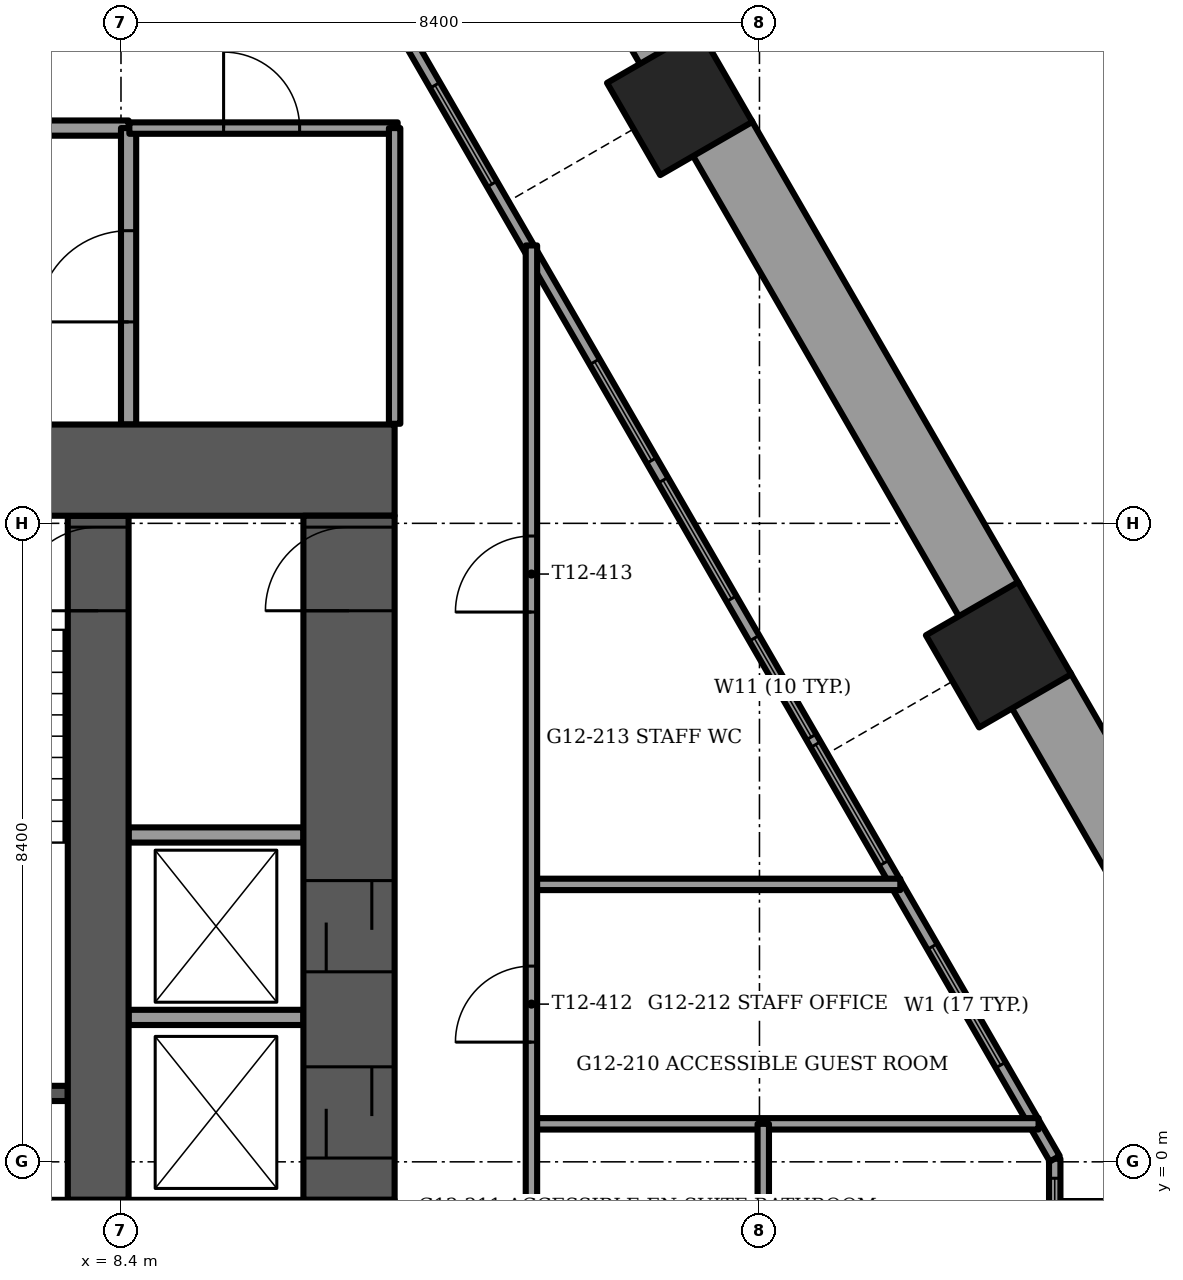
"""IFC4 building model, lengths in metres.
Left out: names, types, materials, properties, quantities, classifications, styles, units other than length and angle.
Written with IfcOpenShell. Run it as: python <this file> out.ifc"""

import sys

from ifc_helpers import new_model, si_unit, direction, frame, frame_2d, origin, origin_2d, place, context, subcontext, project, spatial, rectangle, extrude, element, fill, save


model = new_model("IFC4")
c1 = context("Model", 3, precision=1e-05, world=origin(), true_north=direction((0.0, 1.0)))
c2 = subcontext(c1, "Body", "Model", "MODEL_VIEW")
j1 = project(units=[si_unit("LENGTHUNIT", "METRE"), si_unit("PLANEANGLEUNIT", "RADIAN")], contexts=[c1])
p1 = place(None, origin())
s1 = spatial("IfcSite", under=j1, at=p1, CompositionType="ELEMENT")
p2 = place(p1, origin())
s2 = spatial("IfcBuilding", under=s1, at=p2, CompositionType="ELEMENT")
p3 = place(p2, frame((0.0, 0.0, 50.5)))
s3 = spatial("IfcBuildingStorey", under=s2, at=p3, CompositionType="ELEMENT", Elevation=50.5)
for number, where, z_axis, x_axis in (
    (1, (19.946, 6.671, -1.2), (0.0, 0.0, 1.0), (0.5, -0.866, 0.0)),
    (2, (15.75, 13.938, -1.2), (0.0, 0.0, 1.0), (0.5, -0.866, 0.0)),
):
    element("IfcColumn", number, at=place(p3, frame(where, z_axis=z_axis, x_axis=x_axis)), inside=s3, PredefinedType="COLUMN", context=c2, shape_type="SweptSolid", body=[
        extrude(rectangle(XDim=1.4, YDim=1.4, at=origin_2d()), origin(), (0.0, 0.0, 1.0), 3.75),
    ])
p4 = place(p3, frame((-12.0, 9.1, -0.3), z_axis=(0.0, 0.0, 1.0), x_axis=(1.0, 0.0, 0.0)))
e3 = element("IfcWall", 3, at=p4, inside=s3, PredefinedType="SHEAR", context=c2, shape_type="SweptSolid", body=[
    extrude(rectangle(XDim=24.0, YDim=1.2, at=frame_2d((12.0, 0.0))), origin(), (0.0, 0.0, 1.0), 3.75),
])
p5 = place(p4, frame((11.2, 0.0, 0.0)))
e4 = element("IfcOpeningElement", 4, at=p5, cuts=e3, PredefinedType="OPENING", context=c2, shape_type="SweptSolid", body=[
    extrude(rectangle(XDim=1.6, YDim=2.1, at=frame_2d((0.8, 1.05))), frame((0.0, 0.6, 0.0), z_axis=(0.0, -1.0, 0.0), x_axis=(1.0, 0.0, 0.0)), (0.0, 0.0, 1.0), 1.2),
])
p6 = place(p4, frame((5.25, 0.0, 0.0)))
e5 = element("IfcOpeningElement", 5, at=p6, cuts=e3, PredefinedType="OPENING", context=c2, shape_type="SweptSolid", body=[
    extrude(rectangle(XDim=1.1, YDim=2.1, at=frame_2d((0.55, 1.05))), frame((0.0, 0.6, 0.0), z_axis=(0.0, -1.0, 0.0), x_axis=(1.0, 0.0, 0.0)), (0.0, 0.0, 1.0), 1.2),
])
p7 = place(p4, frame((17.65, 0.0, 0.0)))
e6 = element("IfcOpeningElement", 6, at=p7, cuts=e3, PredefinedType="OPENING", context=c2, shape_type="SweptSolid", body=[
    extrude(rectangle(XDim=1.1, YDim=2.1, at=frame_2d((0.55, 1.05))), frame((0.0, 0.6, 0.0), z_axis=(0.0, -1.0, 0.0), x_axis=(1.0, 0.0, 0.0)), (0.0, 0.0, 1.0), 1.2),
])
p8 = place(p3, frame((8.1, -0.5, -0.3), z_axis=(0.0, 0.0, 1.0), x_axis=(0.0, 1.0, 0.0)))
e7 = element("IfcWall", 7, at=p8, inside=s3, PredefinedType="SHEAR", context=c2, shape_type="SweptSolid", body=[
    extrude(rectangle(XDim=9.0, YDim=0.8, at=frame_2d((4.5, 0.0))), origin(), (0.0, 0.0, 1.0), 3.75),
])
p9 = place(p8, frame((7.75, 0.0, 0.0)))
e8 = element("IfcOpeningElement", 8, at=p9, cuts=e7, PredefinedType="OPENING", context=c2, shape_type="SweptSolid", body=[
    extrude(rectangle(XDim=1.1, YDim=2.1, at=frame_2d((0.55, 1.05))), frame((0.0, 0.4, 0.0), z_axis=(0.0, -1.0, 0.0), x_axis=(1.0, 0.0, 0.0)), (0.0, 0.0, 1.0), 0.8),
])
p10 = place(p3, frame((11.4, -0.5, -0.3), z_axis=(0.0, 0.0, 1.0), x_axis=(0.0, 1.0, 0.0)))
e9 = element("IfcWall", 9, at=p10, inside=s3, PredefinedType="SHEAR", context=c2, shape_type="SweptSolid", body=[
    extrude(rectangle(XDim=9.0, YDim=1.2, at=frame_2d((4.5, 0.0))), origin(), (0.0, 0.0, 1.0), 3.75),
])
p11 = place(p10, frame((7.75, 0.0, 0.0)))
e10 = element("IfcOpeningElement", 10, at=p11, cuts=e9, PredefinedType="OPENING", context=c2, shape_type="SweptSolid", body=[
    extrude(rectangle(XDim=1.1, YDim=2.1, at=frame_2d((0.55, 1.05))), frame((0.0, 0.6, 0.0), z_axis=(0.0, -1.0, 0.0), x_axis=(1.0, 0.0, 0.0)), (0.0, 0.0, 1.0), 1.2),
])
p12 = place(p10, frame((0.55, 0.0, 0.0)))
e11 = element("IfcOpeningElement", 11, at=p12, cuts=e9, PredefinedType="OPENING", context=c2, shape_type="SweptSolid", body=[
    extrude(rectangle(XDim=1.2, YDim=2.1, at=frame_2d((0.6, 1.05))), frame((0.0, 0.6, 0.0), z_axis=(0.0, -1.0, 0.0), x_axis=(1.0, 0.0, 0.0)), (0.0, 0.0, 1.0), 1.2),
])
p13 = place(p10, frame((3.0, 0.0, 0.0)))
e12 = element("IfcOpeningElement", 12, at=p13, cuts=e9, PredefinedType="OPENING", context=c2, shape_type="SweptSolid", body=[
    extrude(rectangle(XDim=1.2, YDim=2.1, at=frame_2d((0.6, 1.05))), frame((0.0, 0.6, 0.0), z_axis=(0.0, -1.0, 0.0), x_axis=(1.0, 0.0, 0.0)), (0.0, 0.0, 1.0), 1.2),
])
p14 = place(p3, frame((23.991, 0.165, 0.0), z_axis=(0.0, 0.0, 1.0), x_axis=(-0.499983583635, 0.86603488157, 0.0)))
e13 = element("IfcWall", 13, at=p14, inside=s3, PredefinedType="PARAPET", context=c2, shape_type="SweptSolid", body=[
    extrude(rectangle(XDim=6.987, YDim=0.9, at=frame_2d((3.494, 0.0))), origin(), (0.0, 0.0, 1.0), 1.1),
])
p15 = place(p3, frame((19.827, 7.376, 0.0), z_axis=(0.0, 0.0, 1.0), x_axis=(-0.499997206141, 0.866027016814, 0.0)))
e14 = element("IfcWall", 14, at=p15, inside=s3, PredefinedType="PARAPET", context=c2, shape_type="SweptSolid", body=[
    extrude(rectangle(XDim=7.051, YDim=0.9, at=frame_2d((3.525, 0.0))), origin(), (0.0, 0.0, 1.0), 1.1),
])
p16 = place(p3, frame((15.632, 14.643, 0.0), z_axis=(0.0, 0.0, 1.0), x_axis=(-0.500009789943, 0.866019751484, 0.0)))
e15 = element("IfcWall", 15, at=p16, inside=s3, PredefinedType="PARAPET", context=c2, shape_type="SweptSolid", body=[
    extrude(rectangle(XDim=6.987, YDim=0.9, at=frame_2d((3.494, 0.0))), origin(), (0.0, 0.0, 1.0), 1.1),
])
p17 = place(p3, frame((20.685, 0.042, 0.0), z_axis=(0.0, 0.0, 1.0), x_axis=(-0.49999960747, 0.866025630412, 0.0)))
e16 = element("IfcWall", 16, at=p17, inside=s3, PredefinedType="SOLIDWALL", context=c2, shape_type="SweptSolid", body=[
    extrude(rectangle(XDim=23.384, YDim=0.15, at=frame_2d((11.692, 0.0))), origin(), (0.0, 0.0, 1.0), 3.45),
])
p18 = place(p17, frame((4.491, 0.0, 0.15)))
e17 = element("IfcOpeningElement", 17, at=p18, cuts=e16, PredefinedType="OPENING", context=c2, shape_type="SweptSolid", body=[
    extrude(rectangle(XDim=1.8, YDim=2.85, at=frame_2d((0.9, 1.425))), frame((0.0, 0.075, 0.0), z_axis=(0.0, -1.0, 0.0), x_axis=(1.0, 0.0, 0.0)), (0.0, 0.0, 1.0), 0.15),
])
p19 = place(p17, frame((6.406, 0.0, 0.15)))
e18 = element("IfcOpeningElement", 18, at=p19, cuts=e16, PredefinedType="OPENING", context=c2, shape_type="SweptSolid", body=[
    extrude(rectangle(XDim=1.5, YDim=2.85, at=frame_2d((0.75, 1.425))), frame((0.0, 0.075, 0.0), z_axis=(0.0, -1.0, 0.0), x_axis=(1.0, 0.0, 0.0)), (0.0, 0.0, 1.0), 0.15),
])
p20 = place(p17, frame((8.506, 0.0, 0.15)))
e19 = element("IfcOpeningElement", 19, at=p20, cuts=e16, PredefinedType="OPENING", context=c2, shape_type="SweptSolid", body=[
    extrude(rectangle(XDim=1.8, YDim=2.85, at=frame_2d((0.9, 1.425))), frame((0.0, 0.075, 0.0), z_axis=(0.0, -1.0, 0.0), x_axis=(1.0, 0.0, 0.0)), (0.0, 0.0, 1.0), 0.15),
])
p21 = place(p17, frame((10.606, 0.0, 0.15)))
e20 = element("IfcOpeningElement", 20, at=p21, cuts=e16, PredefinedType="OPENING", context=c2, shape_type="SweptSolid", body=[
    extrude(rectangle(XDim=1.5, YDim=2.85, at=frame_2d((0.75, 1.425))), frame((0.0, 0.075, 0.0), z_axis=(0.0, -1.0, 0.0), x_axis=(1.0, 0.0, 0.0)), (0.0, 0.0, 1.0), 0.15),
])
p22 = place(p17, frame((14.806, 0.0, 0.15)))
e21 = element("IfcOpeningElement", 21, at=p22, cuts=e16, PredefinedType="OPENING", context=c2, shape_type="SweptSolid", body=[
    extrude(rectangle(XDim=1.5, YDim=2.85, at=frame_2d((0.75, 1.425))), frame((0.0, 0.075, 0.0), z_axis=(0.0, -1.0, 0.0), x_axis=(1.0, 0.0, 0.0)), (0.0, 0.0, 1.0), 0.15),
])
p23 = place(p17, frame((18.861, 0.0, 0.15)))
e22 = element("IfcOpeningElement", 22, at=p23, cuts=e16, PredefinedType="OPENING", context=c2, shape_type="SweptSolid", body=[
    extrude(rectangle(XDim=1.5, YDim=2.85, at=frame_2d((0.75, 1.425))), frame((0.0, 0.075, 0.0), z_axis=(0.0, -1.0, 0.0), x_axis=(1.0, 0.0, 0.0)), (0.0, 0.0, 1.0), 0.15),
])
p24 = place(p17, frame((1.422, 0.0, 0.15)))
e23 = element("IfcOpeningElement", 23, at=p24, cuts=e16, PredefinedType="OPENING", context=c2, shape_type="SweptSolid", body=[
    extrude(rectangle(XDim=1.8, YDim=2.73, at=frame_2d((0.9, 1.365))), frame((0.0, 0.075, 0.0), z_axis=(0.0, -1.0, 0.0), x_axis=(1.0, 0.0, 0.0)), (0.0, 0.0, 1.0), 0.15),
])
p25 = place(p17, frame((21.247, 0.0, 0.15)))
e24 = element("IfcOpeningElement", 24, at=p25, cuts=e16, PredefinedType="OPENING", context=c2, shape_type="SweptSolid", body=[
    extrude(rectangle(XDim=1.8, YDim=2.73, at=frame_2d((0.9, 1.365))), frame((0.0, 0.075, 0.0), z_axis=(0.0, -1.0, 0.0), x_axis=(1.0, 0.0, 0.0)), (0.0, 0.0, 1.0), 0.15),
])
p26 = place(p3, frame((20.685, -1.023, 0.0), z_axis=(0.0, 0.0, 1.0), x_axis=(0.0, 1.0, 0.0)))
e25 = element("IfcWall", 25, at=p26, inside=s3, PredefinedType="SOLIDWALL", context=c2, shape_type="SweptSolid", body=[
    extrude(rectangle(XDim=1.065, YDim=0.15, at=frame_2d((0.532, 0.0))), origin(), (0.0, 0.0, 1.0), 3.45),
])
p27 = place(p26, frame((0.258, 0.0, 0.15)))
e26 = element("IfcOpeningElement", 26, at=p27, cuts=e25, PredefinedType="OPENING", context=c2, shape_type="SweptSolid", body=[
    extrude(rectangle(XDim=0.55, YDim=2.85, at=frame_2d((0.275, 1.425))), frame((0.0, 0.075, 0.0), z_axis=(0.0, -1.0, 0.0), x_axis=(1.0, 0.0, 0.0)), (0.0, 0.0, 1.0), 0.15),
])
p28 = place(p3, frame((4.45, 0.9, -0.3), z_axis=(0.0, 0.0, 1.0), x_axis=(1.0, 0.0, 0.0)))
e27 = element("IfcWall", 27, at=p28, inside=s3, PredefinedType="SOLIDWALL", context=c2, shape_type="SweptSolid", body=[
    extrude(rectangle(XDim=3.25, YDim=0.2, at=frame_2d((1.625, 0.0))), origin(), (0.0, 0.0, 1.0), 3.75),
])
p29 = place(p3, frame((-8.5, 13.6, 0.0), z_axis=(0.0, 0.0, 1.0), x_axis=(1.0, 0.0, 0.0)))
e28 = element("IfcWall", 28, at=p29, inside=s3, PredefinedType="PARTITIONING", context=c2, shape_type="SweptSolid", body=[
    extrude(rectangle(XDim=17.0, YDim=0.2, at=frame_2d((8.5, 0.0))), origin(), (0.0, 0.0, 1.0), 3.45),
])
p30 = place(p29, frame((8.0, 0.0, 0.0)))
e29 = element("IfcOpeningElement", 29, at=p30, cuts=e28, PredefinedType="OPENING", context=c2, shape_type="SweptSolid", body=[
    extrude(rectangle(XDim=1.0, YDim=2.1, at=frame_2d((0.5, 1.05))), frame((0.0, 0.1, 0.0), z_axis=(0.0, -1.0, 0.0), x_axis=(1.0, 0.0, 0.0)), (0.0, 0.0, 1.0), 0.2),
])
p31 = place(p3, frame((8.5, 9.7, 0.0), z_axis=(0.0, 0.0, 1.0), x_axis=(0.0, 1.0, 0.0)))
e30 = element("IfcWall", 30, at=p31, inside=s3, PredefinedType="PARTITIONING", context=c2, shape_type="SweptSolid", body=[
    extrude(rectangle(XDim=3.9, YDim=0.2, at=frame_2d((1.95, 0.0))), origin(), (0.0, 0.0, 1.0), 3.45),
])
p32 = place(p31, frame((1.35, 0.0, 0.0)))
e31 = element("IfcOpeningElement", 31, at=p32, cuts=e30, PredefinedType="OPENING", context=c2, shape_type="SweptSolid", body=[
    extrude(rectangle(XDim=1.2, YDim=2.1, at=frame_2d((0.6, 1.05))), frame((0.0, 0.1, 0.0), z_axis=(0.0, -1.0, 0.0), x_axis=(1.0, 0.0, 0.0)), (0.0, 0.0, 1.0), 0.2),
])
for number, where, z_axis, x_axis in (
    (32, (8.5, 1.9, 0.0), (0.0, 0.0, 1.0), (1.0, 0.0, 0.0)),
    (33, (8.5, 4.3, 0.0), (0.0, 0.0, 1.0), (1.0, 0.0, 0.0)),
):
    element("IfcWall", number, at=place(p3, frame(where, z_axis=z_axis, x_axis=x_axis)), inside=s3, PredefinedType="PARTITIONING", context=c2, shape_type="SweptSolid", body=[
        extrude(rectangle(XDim=2.3, YDim=0.2, at=frame_2d((1.15, 0.0))), origin(), (0.0, 0.0, 1.0), 3.45),
    ])
p33 = place(p3, frame((13.8, 0.5, 0.0), z_axis=(0.0, 0.0, 1.0), x_axis=(1.0, 0.0, 0.0)))
e34 = element("IfcWall", 34, at=p33, inside=s3, PredefinedType="PARTITIONING", context=c2, shape_type="SweptSolid", body=[
    extrude(rectangle(XDim=6.672, YDim=0.15, at=frame_2d((3.336, 0.0))), origin(), (0.0, 0.0, 1.0), 3.45),
])
p34 = place(p3, frame((13.8, 3.65, 0.0), z_axis=(0.0, 0.0, 1.0), x_axis=(1.0, 0.0, 0.0)))
e35 = element("IfcWall", 35, at=p34, inside=s3, PredefinedType="PARTITIONING", context=c2, shape_type="SweptSolid", body=[
    extrude(rectangle(XDim=4.853, YDim=0.15, at=frame_2d((2.427, 0.0))), origin(), (0.0, 0.0, 1.0), 3.45),
])
p35 = place(p3, frame((8.51, 13.6, 0.0), z_axis=(0.0, 0.0, 1.0), x_axis=(1.0, 0.0, 0.0)))
e36 = element("IfcWall", 36, at=p35, inside=s3, PredefinedType="PARTITIONING", context=c2, shape_type="SweptSolid", body=[
    extrude(rectangle(XDim=3.53, YDim=0.15, at=frame_2d((1.765, 0.0))), origin(), (0.0, 0.0, 1.0), 3.45),
])
p36 = place(p35, frame((1.24, 0.0, 0.0)))
e37 = element("IfcOpeningElement", 37, at=p36, cuts=e36, PredefinedType="OPENING", context=c2, shape_type="SweptSolid", body=[
    extrude(rectangle(XDim=1.0, YDim=2.1, at=frame_2d((0.5, 1.05))), frame((0.0, 0.075, 0.0), z_axis=(0.0, -1.0, 0.0), x_axis=(1.0, 0.0, 0.0)), (0.0, 0.0, 1.0), 0.15),
])
p37 = place(p3, frame((16.85, -2.3, 0.0), z_axis=(0.0, 0.0, 1.0), x_axis=(0.0, 1.0, 0.0)))
e38 = element("IfcWall", 38, at=p37, inside=s3, PredefinedType="PARTITIONING", context=c2, shape_type="SweptSolid", body=[
    extrude(rectangle(XDim=2.8, YDim=0.15, at=frame_2d((1.4, 0.0))), origin(), (0.0, 0.0, 1.0), 3.45),
])
p38 = place(p3, frame((13.8, -3.7, 0.0), z_axis=(0.0, 0.0, 1.0), x_axis=(0.0, 1.0, 0.0)))
e39 = element("IfcWall", 39, at=p38, inside=s3, PredefinedType="PARTITIONING", context=c2, shape_type="SweptSolid", body=[
    extrude(rectangle(XDim=15.756, YDim=0.15, at=frame_2d((7.878, 0.0))), origin(), (0.0, 0.0, 1.0), 3.45),
])
p39 = place(p38, frame((0.25, 0.0, 0.0)))
e40 = element("IfcOpeningElement", 40, at=p39, cuts=e39, PredefinedType="OPENING", context=c2, shape_type="SweptSolid", body=[
    extrude(rectangle(XDim=1.0, YDim=2.1, at=frame_2d((0.5, 1.05))), frame((0.0, 0.075, 0.0), z_axis=(0.0, -1.0, 0.0), x_axis=(1.0, 0.0, 0.0)), (0.0, 0.0, 1.0), 0.15),
])
p40 = place(p38, frame((5.275, 0.0, 0.0)))
e41 = element("IfcOpeningElement", 41, at=p40, cuts=e39, PredefinedType="OPENING", context=c2, shape_type="SweptSolid", body=[
    extrude(rectangle(XDim=1.0, YDim=2.1, at=frame_2d((0.5, 1.05))), frame((0.0, 0.075, 0.0), z_axis=(0.0, -1.0, 0.0), x_axis=(1.0, 0.0, 0.0)), (0.0, 0.0, 1.0), 0.15),
])
p41 = place(p38, frame((10.933, 0.0, 0.0)))
e42 = element("IfcOpeningElement", 42, at=p41, cuts=e39, PredefinedType="OPENING", context=c2, shape_type="SweptSolid", body=[
    extrude(rectangle(XDim=1.0, YDim=2.1, at=frame_2d((0.5, 1.05))), frame((0.0, 0.075, 0.0), z_axis=(0.0, -1.0, 0.0), x_axis=(1.0, 0.0, 0.0)), (0.0, 0.0, 1.0), 0.15),
])
p42 = place(p3, frame((12.0, 9.71, 0.0), z_axis=(0.0, 0.0, 1.0), x_axis=(0.0, 1.0, 0.0)))
e43 = element("IfcWall", 43, at=p42, inside=s3, PredefinedType="PARTITIONING", context=c2, shape_type="SweptSolid", body=[
    extrude(rectangle(XDim=3.89, YDim=0.15, at=frame_2d((1.945, 0.0))), origin(), (0.0, 0.0, 1.0), 3.45),
])
p43 = place(p18, origin())
e44 = element("IfcWindow", 44, at=p43, inside=s3, PartitioningType="SINGLE_PANEL", PredefinedType="WINDOW", context=c2, shape_type="SweptSolid", body=[
    extrude(rectangle(XDim=1.8, YDim=2.85, at=frame_2d((0.9, 1.425))), frame((0.0, 0.03, 0.0), z_axis=(0.0, -1.0, 0.0), x_axis=(1.0, 0.0, 0.0)), (0.0, 0.0, 1.0), 0.06),
])
fill(e17, e44)
p44 = place(p19, origin())
e45 = element("IfcWindow", 45, at=p44, inside=s3, PartitioningType="SINGLE_PANEL", PredefinedType="WINDOW", context=c2, shape_type="SweptSolid", body=[
    extrude(rectangle(XDim=1.5, YDim=2.85, at=frame_2d((0.75, 1.425))), frame((0.0, 0.03, 0.0), z_axis=(0.0, -1.0, 0.0), x_axis=(1.0, 0.0, 0.0)), (0.0, 0.0, 1.0), 0.06),
])
fill(e18, e45)
p45 = place(p20, origin())
e46 = element("IfcWindow", 46, at=p45, inside=s3, PartitioningType="SINGLE_PANEL", PredefinedType="WINDOW", context=c2, shape_type="SweptSolid", body=[
    extrude(rectangle(XDim=1.8, YDim=2.85, at=frame_2d((0.9, 1.425))), frame((0.0, 0.03, 0.0), z_axis=(0.0, -1.0, 0.0), x_axis=(1.0, 0.0, 0.0)), (0.0, 0.0, 1.0), 0.06),
])
fill(e19, e46)
p46 = place(p21, origin())
e47 = element("IfcWindow", 47, at=p46, inside=s3, PartitioningType="SINGLE_PANEL", PredefinedType="WINDOW", context=c2, shape_type="SweptSolid", body=[
    extrude(rectangle(XDim=1.5, YDim=2.85, at=frame_2d((0.75, 1.425))), frame((0.0, 0.03, 0.0), z_axis=(0.0, -1.0, 0.0), x_axis=(1.0, 0.0, 0.0)), (0.0, 0.0, 1.0), 0.06),
])
fill(e20, e47)
p47 = place(p22, origin())
e48 = element("IfcWindow", 48, at=p47, inside=s3, PartitioningType="SINGLE_PANEL", PredefinedType="WINDOW", context=c2, shape_type="SweptSolid", body=[
    extrude(rectangle(XDim=1.5, YDim=2.85, at=frame_2d((0.75, 1.425))), frame((0.0, 0.03, 0.0), z_axis=(0.0, -1.0, 0.0), x_axis=(1.0, 0.0, 0.0)), (0.0, 0.0, 1.0), 0.06),
])
fill(e21, e48)
p48 = place(p24, origin())
e49 = element("IfcWindow", 49, at=p48, inside=s3, PartitioningType="SINGLE_PANEL", PredefinedType="WINDOW", context=c2, shape_type="SweptSolid", body=[
    extrude(rectangle(XDim=1.8, YDim=2.73, at=frame_2d((0.9, 1.365))), frame((0.0, 0.03, 0.0), z_axis=(0.0, -1.0, 0.0), x_axis=(1.0, 0.0, 0.0)), (0.0, 0.0, 1.0), 0.06),
])
fill(e23, e49)
p49 = place(p27, origin())
e50 = element("IfcWindow", 50, at=p49, inside=s3, PartitioningType="SINGLE_PANEL", PredefinedType="WINDOW", context=c2, shape_type="SweptSolid", body=[
    extrude(rectangle(XDim=0.55, YDim=2.85, at=frame_2d((0.275, 1.425))), frame((0.0, 0.03, 0.0), z_axis=(0.0, -1.0, 0.0), x_axis=(1.0, 0.0, 0.0)), (0.0, 0.0, 1.0), 0.06),
])
fill(e26, e50)
p50 = place(p9, origin())
e51 = element("IfcDoor", 51, at=p50, inside=s3, OperationType="SINGLE_SWING_LEFT", PredefinedType="DOOR", context=c2, shape_type="SweptSolid", body=[
    extrude(rectangle(XDim=1.1, YDim=2.1, at=frame_2d((0.55, 1.05))), frame((0.0, 0.025, 0.0), z_axis=(0.0, -1.0, 0.0), x_axis=(1.0, 0.0, 0.0)), (0.0, 0.0, 1.0), 0.05),
])
fill(e8, e51)
p51 = place(p32, origin())
e52 = element("IfcDoor", 52, at=p51, inside=s3, OperationType="SINGLE_SWING_LEFT", PredefinedType="DOOR", context=c2, shape_type="SweptSolid", body=[
    extrude(rectangle(XDim=1.2, YDim=2.1, at=frame_2d((0.6, 1.05))), frame((0.0, 0.025, 0.0), z_axis=(0.0, -1.0, 0.0), x_axis=(1.0, 0.0, 0.0)), (0.0, 0.0, 1.0), 0.05),
])
fill(e31, e52)
p52 = place(p11, origin())
e53 = element("IfcDoor", 53, at=p52, inside=s3, OperationType="SINGLE_SWING_RIGHT", PredefinedType="DOOR", context=c2, shape_type="SweptSolid", body=[
    extrude(rectangle(XDim=1.1, YDim=2.1, at=frame_2d((0.55, 1.05))), frame((0.0, 0.025, 0.0), z_axis=(0.0, -1.0, 0.0), x_axis=(1.0, 0.0, 0.0)), (0.0, 0.0, 1.0), 0.05),
])
fill(e10, e53)
p53 = place(p12, origin())
e54 = element("IfcDoor", 54, at=p53, inside=s3, OperationType="SLIDING_TO_LEFT", PredefinedType="DOOR", context=c2, shape_type="SweptSolid", body=[
    extrude(rectangle(XDim=1.2, YDim=2.1, at=frame_2d((0.6, 1.05))), frame((0.0, 0.025, 0.0), z_axis=(0.0, -1.0, 0.0), x_axis=(1.0, 0.0, 0.0)), (0.0, 0.0, 1.0), 0.05),
])
fill(e11, e54)
p54 = place(p13, origin())
e55 = element("IfcDoor", 55, at=p54, inside=s3, OperationType="SLIDING_TO_LEFT", PredefinedType="DOOR", context=c2, shape_type="SweptSolid", body=[
    extrude(rectangle(XDim=1.2, YDim=2.1, at=frame_2d((0.6, 1.05))), frame((0.0, 0.025, 0.0), z_axis=(0.0, -1.0, 0.0), x_axis=(1.0, 0.0, 0.0)), (0.0, 0.0, 1.0), 0.05),
])
fill(e12, e55)
p55 = place(p40, origin())
e56 = element("IfcDoor", 56, at=p55, inside=s3, OperationType="SINGLE_SWING_LEFT", PredefinedType="DOOR", context=c2, shape_type="SweptSolid", body=[
    extrude(rectangle(XDim=1.0, YDim=2.1, at=frame_2d((0.5, 1.05))), frame((0.0, 0.025, 0.0), z_axis=(0.0, -1.0, 0.0), x_axis=(1.0, 0.0, 0.0)), (0.0, 0.0, 1.0), 0.05),
])
fill(e41, e56)
p56 = place(p41, origin())
e57 = element("IfcDoor", 57, at=p56, inside=s3, OperationType="SINGLE_SWING_LEFT", PredefinedType="DOOR", context=c2, shape_type="SweptSolid", body=[
    extrude(rectangle(XDim=1.0, YDim=2.1, at=frame_2d((0.5, 1.05))), frame((0.0, 0.025, 0.0), z_axis=(0.0, -1.0, 0.0), x_axis=(1.0, 0.0, 0.0)), (0.0, 0.0, 1.0), 0.05),
])
fill(e42, e57)
p57 = place(p36, origin())
e58 = element("IfcDoor", 58, at=p57, inside=s3, OperationType="SINGLE_SWING_LEFT", PredefinedType="DOOR", context=c2, shape_type="SweptSolid", body=[
    extrude(rectangle(XDim=1.0, YDim=2.1, at=frame_2d((0.5, 1.05))), frame((0.0, 0.025, 0.0), z_axis=(0.0, -1.0, 0.0), x_axis=(1.0, 0.0, 0.0)), (0.0, 0.0, 1.0), 0.05),
])
fill(e37, e58)
save(model, sys.argv[1])
